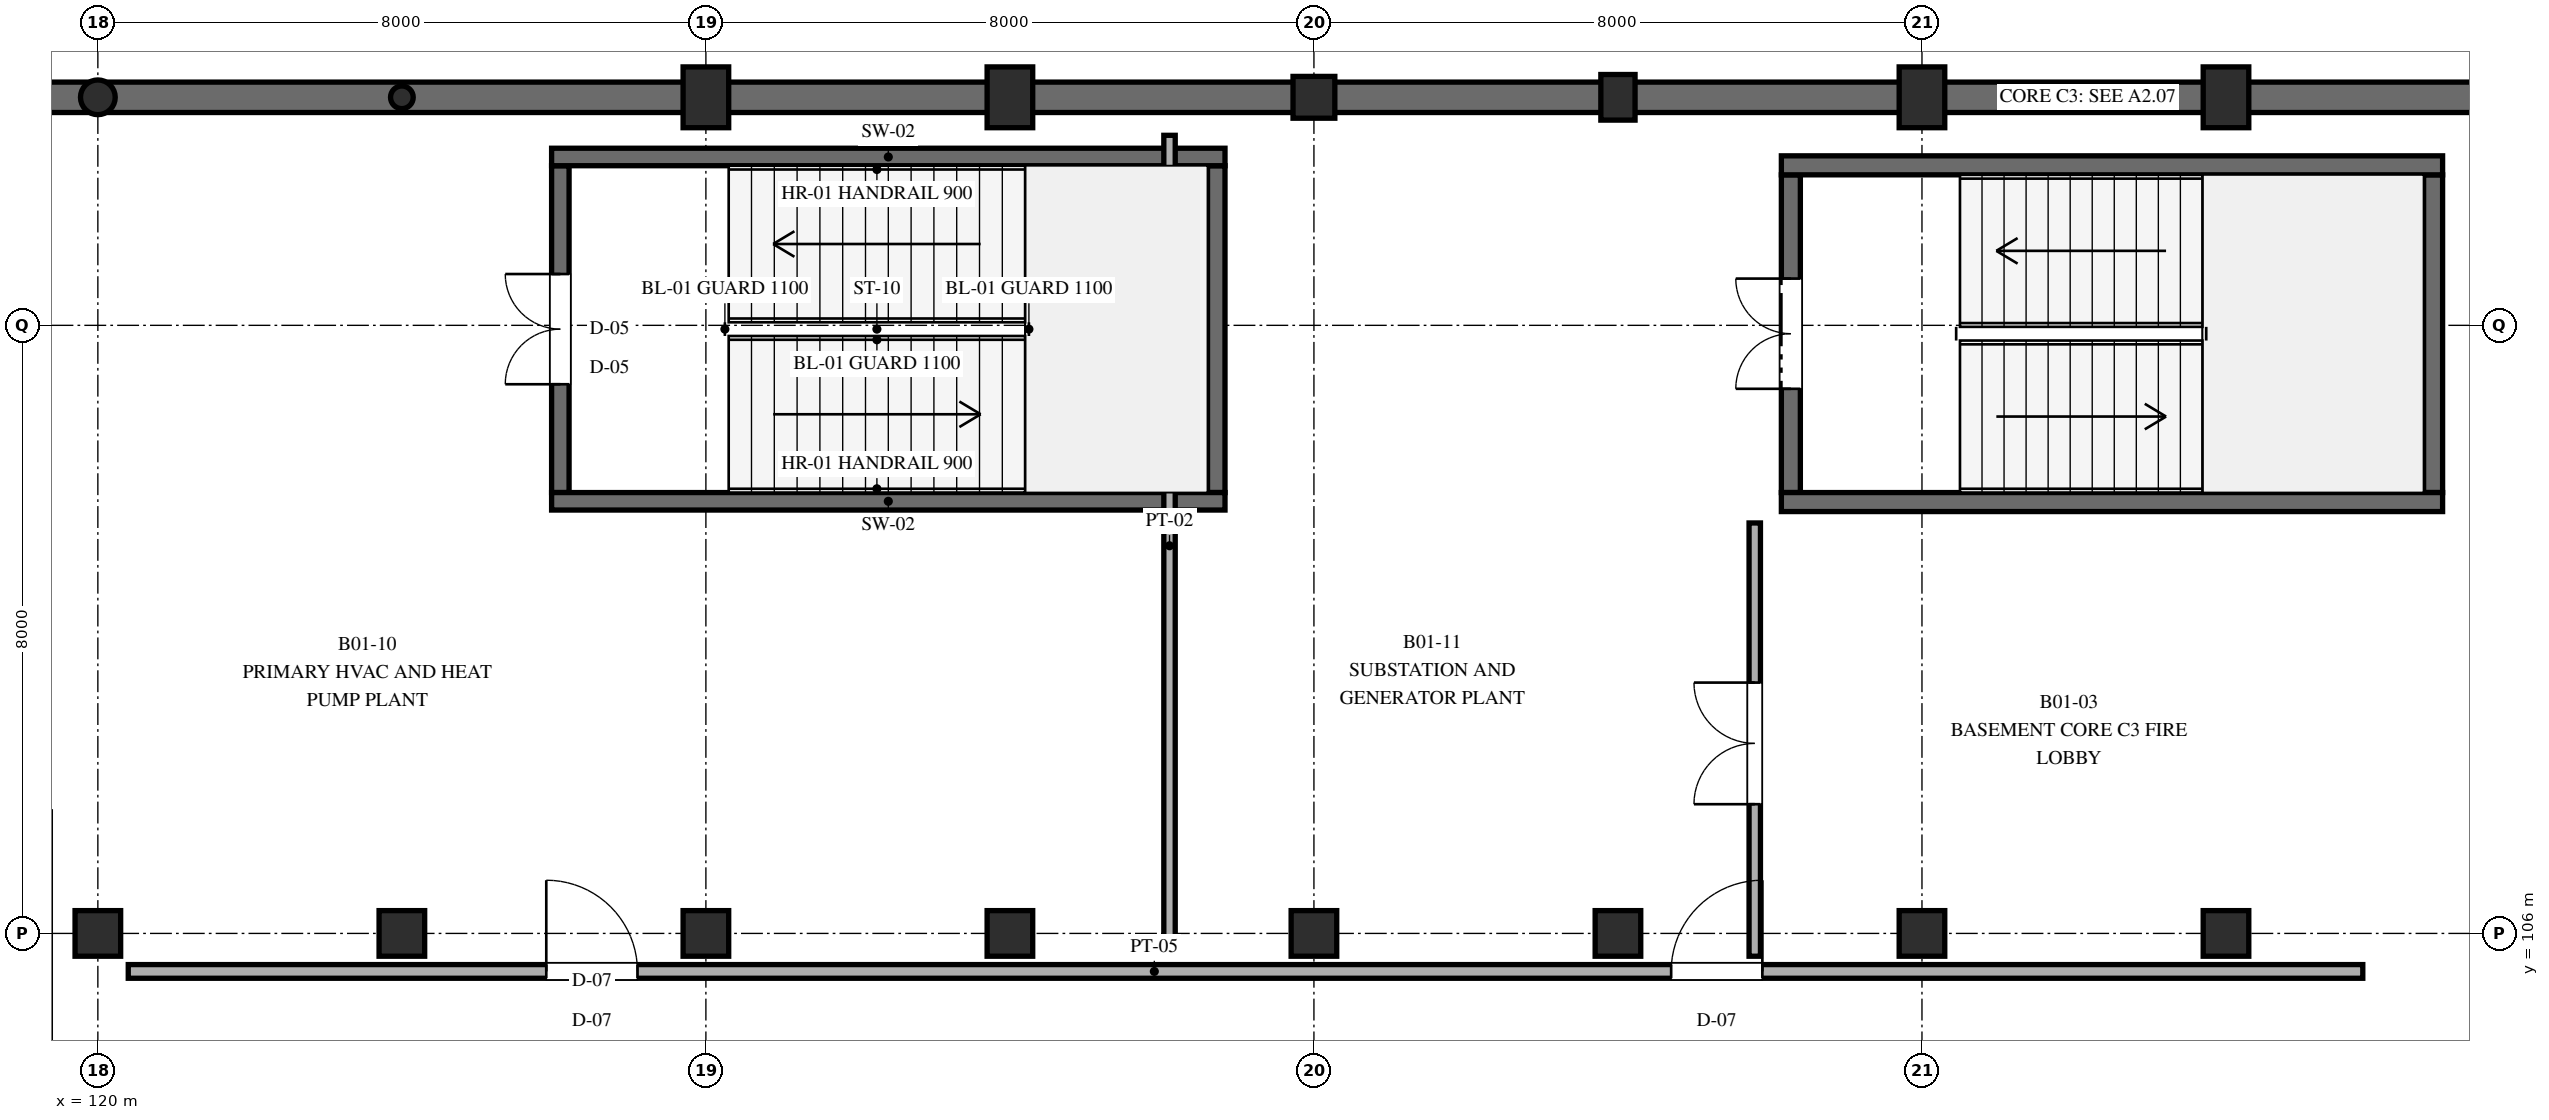
"""IFC4 building model, lengths in metres.
Left out: names, types, materials, properties, quantities, classifications, styles, units other than length and angle.
Written with IfcOpenShell. Run it as: python <this file> out.ifc"""

import sys

from ifc_helpers import new_model, si_unit, direction, frame, frame_2d, origin, origin_2d, place, context, subcontext, project, spatial, rectangle, hollow_circle, extrude, element, fill, save


model = new_model("IFC4")
c1 = context("Model", 3, precision=1e-05, world=origin(), true_north=direction((0.0, 1.0)))
c2 = subcontext(c1, "Body", "Model", "MODEL_VIEW")
j1 = project(units=[si_unit("LENGTHUNIT", "METRE"), si_unit("PLANEANGLEUNIT", "RADIAN")], contexts=[c1])
p1 = place(None, origin())
s1 = spatial("IfcSite", under=j1, at=p1, CompositionType="ELEMENT")
p2 = place(p1, origin())
s2 = spatial("IfcBuilding", under=s1, at=p2, CompositionType="ELEMENT")
p3 = place(p2, frame((0.0, 0.0, -4.2)))
s3 = spatial("IfcBuildingStorey", under=s2, at=p3, CompositionType="ELEMENT", Elevation=-4.2)
p4 = place(p3, frame((120.0, 106.0, 0.0), z_axis=(0.0, 0.0, 1.0), x_axis=(1.0, 0.0, 0.0)))
e1 = element("IfcColumn", 1, at=p4, inside=s3, PredefinedType="COLUMN", context=c2, shape_type="SweptSolid", body=[
    extrude(rectangle(XDim=0.6, YDim=0.6, at=origin_2d()), origin(), (0.0, 0.0, 1.0), 4.2),
])
p5 = place(p3, frame((120.0, 117.0, 0.0), z_axis=(0.0, 0.0, 1.0), x_axis=(1.0, 0.0, 0.0)))
e2 = element("IfcColumn", 2, at=p5, inside=s3, PredefinedType="COLUMN", context=c2, shape_type="SweptSolid", body=[
    extrude(hollow_circle(Radius=0.229, WallThickness=0.016, at=origin_2d()), origin(), (0.0, 0.0, 1.0), 4.2),
])
p6 = place(p3, frame((124.0, 106.0, 0.0), z_axis=(0.0, 0.0, 1.0), x_axis=(1.0, 0.0, 0.0)))
e3 = element("IfcColumn", 3, at=p6, inside=s3, PredefinedType="COLUMN", context=c2, shape_type="SweptSolid", body=[
    extrude(rectangle(XDim=0.6, YDim=0.6, at=origin_2d()), origin(), (0.0, 0.0, 1.0), 4.2),
])
p7 = place(p3, frame((124.0, 117.0, 0.0), z_axis=(0.0, 0.0, 1.0), x_axis=(1.0, 0.0, 0.0)))
e4 = element("IfcColumn", 4, at=p7, inside=s3, PredefinedType="COLUMN", context=c2, shape_type="SweptSolid", body=[
    extrude(hollow_circle(Radius=0.149, WallThickness=0.012, at=origin_2d()), origin(), (0.0, 0.0, 1.0), 4.2),
])
p8 = place(p3, frame((128.0, 106.0, 0.0), z_axis=(0.0, 0.0, 1.0), x_axis=(1.0, 0.0, 0.0)))
e5 = element("IfcColumn", 5, at=p8, inside=s3, PredefinedType="COLUMN", context=c2, shape_type="SweptSolid", body=[
    extrude(rectangle(XDim=0.6, YDim=0.6, at=origin_2d()), origin(), (0.0, 0.0, 1.0), 4.2),
])
p9 = place(p3, frame((128.0, 117.0, 0.0), z_axis=(0.0, 0.0, 1.0), x_axis=(1.0, 0.0, 0.0)))
e6 = element("IfcColumn", 6, at=p9, inside=s3, PredefinedType="COLUMN", context=c2, shape_type="SweptSolid", body=[
    extrude(rectangle(XDim=0.6, YDim=0.8, at=origin_2d()), origin(), (0.0, 0.0, 1.0), 4.2),
])
p10 = place(p3, frame((132.0, 106.0, 0.0), z_axis=(0.0, 0.0, 1.0), x_axis=(1.0, 0.0, 0.0)))
e7 = element("IfcColumn", 7, at=p10, inside=s3, PredefinedType="COLUMN", context=c2, shape_type="SweptSolid", body=[
    extrude(rectangle(XDim=0.6, YDim=0.6, at=origin_2d()), origin(), (0.0, 0.0, 1.0), 4.2),
])
p11 = place(p3, frame((132.0, 117.0, 0.0), z_axis=(0.0, 0.0, 1.0), x_axis=(1.0, 0.0, 0.0)))
e8 = element("IfcColumn", 8, at=p11, inside=s3, PredefinedType="COLUMN", context=c2, shape_type="SweptSolid", body=[
    extrude(rectangle(XDim=0.6, YDim=0.8, at=origin_2d()), origin(), (0.0, 0.0, 1.0), 4.2),
])
p12 = place(p3, frame((136.0, 106.0, 0.0), z_axis=(0.0, 0.0, 1.0), x_axis=(1.0, 0.0, 0.0)))
e9 = element("IfcColumn", 9, at=p12, inside=s3, PredefinedType="COLUMN", context=c2, shape_type="SweptSolid", body=[
    extrude(rectangle(XDim=0.6, YDim=0.6, at=origin_2d()), origin(), (0.0, 0.0, 1.0), 4.2),
])
p13 = place(p3, frame((136.0, 117.0, 0.0), z_axis=(0.0, 0.0, 1.0), x_axis=(1.0, 0.0, 0.0)))
e10 = element("IfcColumn", 10, at=p13, inside=s3, PredefinedType="COLUMN", context=c2, shape_type="SweptSolid", body=[
    extrude(rectangle(XDim=0.55, YDim=0.55, at=origin_2d()), origin(), (0.0, 0.0, 1.0), 4.2),
])
p14 = place(p3, frame((140.0, 106.0, 0.0), z_axis=(0.0, 0.0, 1.0), x_axis=(1.0, 0.0, 0.0)))
e11 = element("IfcColumn", 11, at=p14, inside=s3, PredefinedType="COLUMN", context=c2, shape_type="SweptSolid", body=[
    extrude(rectangle(XDim=0.6, YDim=0.6, at=origin_2d()), origin(), (0.0, 0.0, 1.0), 4.2),
])
p15 = place(p3, frame((140.0, 117.0, 0.0), z_axis=(0.0, 0.0, 1.0), x_axis=(1.0, 0.0, 0.0)))
e12 = element("IfcColumn", 12, at=p15, inside=s3, PredefinedType="COLUMN", context=c2, shape_type="SweptSolid", body=[
    extrude(rectangle(XDim=0.45, YDim=0.6, at=origin_2d()), origin(), (0.0, 0.0, 1.0), 4.2),
])
p16 = place(p3, frame((144.0, 106.0, 0.0), z_axis=(0.0, 0.0, 1.0), x_axis=(1.0, 0.0, 0.0)))
e13 = element("IfcColumn", 13, at=p16, inside=s3, PredefinedType="COLUMN", context=c2, shape_type="SweptSolid", body=[
    extrude(rectangle(XDim=0.6, YDim=0.6, at=origin_2d()), origin(), (0.0, 0.0, 1.0), 4.2),
])
p17 = place(p3, frame((144.0, 117.0, 0.0), z_axis=(0.0, 0.0, 1.0), x_axis=(1.0, 0.0, 0.0)))
e14 = element("IfcColumn", 14, at=p17, inside=s3, PredefinedType="COLUMN", context=c2, shape_type="SweptSolid", body=[
    extrude(rectangle(XDim=0.6, YDim=0.8, at=origin_2d()), origin(), (0.0, 0.0, 1.0), 4.2),
])
p18 = place(p3, frame((148.0, 106.0, 0.0), z_axis=(0.0, 0.0, 1.0), x_axis=(1.0, 0.0, 0.0)))
e15 = element("IfcColumn", 15, at=p18, inside=s3, PredefinedType="COLUMN", context=c2, shape_type="SweptSolid", body=[
    extrude(rectangle(XDim=0.6, YDim=0.6, at=origin_2d()), origin(), (0.0, 0.0, 1.0), 4.2),
])
p19 = place(p3, frame((148.0, 117.0, 0.0), z_axis=(0.0, 0.0, 1.0), x_axis=(1.0, 0.0, 0.0)))
e16 = element("IfcColumn", 16, at=p19, inside=s3, PredefinedType="COLUMN", context=c2, shape_type="SweptSolid", body=[
    extrude(rectangle(XDim=0.6, YDim=0.8, at=origin_2d()), origin(), (0.0, 0.0, 1.0), 4.2),
])
p20 = place(p3, frame((174.2, 117.0, 0.0), z_axis=(0.0, 0.0, 1.0), x_axis=(-1.0, 0.0, 0.0)))
e17 = element("IfcWall", 17, at=p20, inside=s3, PredefinedType="SOLIDWALL", context=c2, shape_type="SweptSolid", body=[
    extrude(rectangle(XDim=70.4, YDim=0.4, at=frame_2d((35.2, 0.0))), origin(), (0.0, 0.0, 1.0), 3.93),
])
p21 = place(p3, frame((142.275, 111.8, 0.0), z_axis=(0.0, 0.0, 1.0), x_axis=(0.0, 1.0, 0.0)))
e18 = element("IfcWall", 18, at=p21, inside=s3, PredefinedType="SHEAR", context=c2, shape_type="SweptSolid", body=[
    extrude(rectangle(XDim=4.18, YDim=0.25, at=frame_2d((2.09, 0.0))), origin(), (0.0, 0.0, 1.0), 4.2),
])
p22 = place(p21, frame((1.365, 0.0, 0.0)))
e19 = element("IfcOpeningElement", 19, at=p22, cuts=e18, PredefinedType="OPENING", context=c2, shape_type="SweptSolid", body=[
    extrude(rectangle(XDim=1.45, YDim=2.2, at=frame_2d((0.725, 1.1))), frame((0.0, 0.135, 0.0), z_axis=(0.0, -1.0, 0.0), x_axis=(1.0, 0.0, 0.0)), (0.0, 0.0, 1.0), 0.27),
])
p23 = place(p3, frame((150.725, 115.98, 0.0), z_axis=(0.0, 0.0, 1.0), x_axis=(0.0, -1.0, 0.0)))
e20 = element("IfcWall", 20, at=p23, inside=s3, PredefinedType="SHEAR", context=c2, shape_type="SweptSolid", body=[
    extrude(rectangle(XDim=4.18, YDim=0.25, at=frame_2d((2.09, 0.0))), origin(), (0.0, 0.0, 1.0), 4.2),
])
for number, where, z_axis, x_axis in (
    (21, (142.15, 111.675, 0.0), (0.0, 0.0, 1.0), (1.0, 0.0, 0.0)),
    (22, (150.85, 116.105, 0.0), (0.0, 0.0, 1.0), (-1.0, 0.0, 0.0)),
):
    element("IfcWall", number, at=place(p3, frame(where, z_axis=z_axis, x_axis=x_axis)), inside=s3, PredefinedType="SHEAR", context=c2, shape_type="SweptSolid", body=[
        extrude(rectangle(XDim=8.7, YDim=0.25, at=frame_2d((4.35, 0.0))), origin(), (0.0, 0.0, 1.0), 4.2),
    ])
p24 = place(p3, frame((126.085, 111.8, 0.0), z_axis=(0.0, 0.0, 1.0), x_axis=(0.0, 1.0, 0.0)))
e23 = element("IfcWall", 23, at=p24, inside=s3, PredefinedType="SHEAR", context=c2, shape_type="SweptSolid", body=[
    extrude(rectangle(XDim=4.3, YDim=0.23, at=frame_2d((2.15, 0.0))), origin(), (0.0, 0.0, 1.0), 4.2),
])
p25 = place(p24, frame((1.425, 0.0, 0.0)))
e24 = element("IfcOpeningElement", 24, at=p25, cuts=e23, PredefinedType="OPENING", context=c2, shape_type="SweptSolid", body=[
    extrude(rectangle(XDim=1.45, YDim=2.2, at=frame_2d((0.725, 1.1))), frame((0.0, 0.125, 0.0), z_axis=(0.0, -1.0, 0.0), x_axis=(1.0, 0.0, 0.0)), (0.0, 0.0, 1.0), 0.25),
])
p26 = place(p3, frame((134.715, 116.1, 0.0), z_axis=(0.0, 0.0, 1.0), x_axis=(0.0, -1.0, 0.0)))
e25 = element("IfcWall", 25, at=p26, inside=s3, PredefinedType="SHEAR", context=c2, shape_type="SweptSolid", body=[
    extrude(rectangle(XDim=4.3, YDim=0.23, at=frame_2d((2.15, 0.0))), origin(), (0.0, 0.0, 1.0), 4.2),
])
for number, where, z_axis, x_axis in (
    (26, (125.97, 111.685, 0.0), (0.0, 0.0, 1.0), (1.0, 0.0, 0.0)),
    (27, (134.83, 116.215, 0.0), (0.0, 0.0, 1.0), (-1.0, 0.0, 0.0)),
):
    element("IfcWall", number, at=place(p3, frame(where, z_axis=z_axis, x_axis=x_axis)), inside=s3, PredefinedType="SHEAR", context=c2, shape_type="SweptSolid", body=[
        extrude(rectangle(XDim=8.86, YDim=0.23, at=frame_2d((4.43, 0.0))), origin(), (0.0, 0.0, 1.0), 4.2),
    ])
p27 = place(p3, frame((120.4, 105.5, 0.0), z_axis=(0.0, 0.0, 1.0), x_axis=(1.0, 0.0, 0.0)))
e28 = element("IfcWall", 28, at=p27, inside=s3, PredefinedType="PARTITIONING", context=c2, shape_type="SweptSolid", body=[
    extrude(rectangle(XDim=29.4, YDim=0.18, at=frame_2d((14.7, 0.0))), origin(), (0.0, 0.0, 1.0), 3.25),
])
p28 = place(p27, frame((5.5, 0.0, 0.0)))
e29 = element("IfcOpeningElement", 29, at=p28, cuts=e28, PredefinedType="OPENING", context=c2, shape_type="SweptSolid", body=[
    extrude(rectangle(XDim=1.2, YDim=2.2, at=frame_2d((0.6, 1.1))), frame((0.0, 0.1, 0.0), z_axis=(0.0, -1.0, 0.0), x_axis=(1.0, 0.0, 0.0)), (0.0, 0.0, 1.0), 0.2),
])
p29 = place(p27, frame((20.3, 0.0, 0.0)))
e30 = element("IfcOpeningElement", 30, at=p29, cuts=e28, PredefinedType="OPENING", context=c2, shape_type="SweptSolid", body=[
    extrude(rectangle(XDim=1.2, YDim=2.2, at=frame_2d((0.6, 1.1))), frame((0.0, 0.1, 0.0), z_axis=(0.0, -1.0, 0.0), x_axis=(1.0, 0.0, 0.0)), (0.0, 0.0, 1.0), 0.2),
])
p30 = place(p3, frame((134.1, 105.7, 0.0), z_axis=(0.0, 0.0, 1.0), x_axis=(0.0, 1.0, 0.0)))
e31 = element("IfcWall", 31, at=p30, inside=s3, PredefinedType="PARTITIONING", context=c2, shape_type="SweptSolid", body=[
    extrude(rectangle(XDim=10.8, YDim=0.15, at=frame_2d((5.4, 0.0))), origin(), (0.0, 0.0, 1.0), 3.25),
])
p31 = place(p3, frame((141.8, 105.7, 0.0), z_axis=(0.0, 0.0, 1.0), x_axis=(0.0, 1.0, 0.0)))
e32 = element("IfcWall", 32, at=p31, inside=s3, PredefinedType="PARTITIONING", context=c2, shape_type="SweptSolid", body=[
    extrude(rectangle(XDim=5.7, YDim=0.15, at=frame_2d((2.85, 0.0))), origin(), (0.0, 0.0, 1.0), 3.25),
])
p32 = place(p31, frame((2.0, 0.0, 0.0)))
e33 = element("IfcOpeningElement", 33, at=p32, cuts=e32, PredefinedType="OPENING", context=c2, shape_type="SweptSolid", body=[
    extrude(rectangle(XDim=1.6, YDim=2.2, at=frame_2d((0.8, 1.1))), frame((0.0, 0.085, 0.0), z_axis=(0.0, -1.0, 0.0), x_axis=(1.0, 0.0, 0.0)), (0.0, 0.0, 1.0), 0.17),
])
p33 = place(p22, origin())
e34 = element("IfcDoor", 34, at=p33, inside=s3, OperationType="DOUBLE_DOOR_SINGLE_SWING", PredefinedType="DOOR", context=c2, shape_type="SweptSolid", body=[
    extrude(rectangle(XDim=1.45, YDim=2.2, at=frame_2d((0.725, 1.1))), frame((0.0, 0.025, 0.0), z_axis=(0.0, -1.0, 0.0), x_axis=(1.0, 0.0, 0.0)), (0.0, 0.0, 1.0), 0.05),
])
fill(e19, e34)
p34 = place(p25, origin())
e35 = element("IfcDoor", 35, at=p34, inside=s3, OperationType="DOUBLE_DOOR_SINGLE_SWING", PredefinedType="DOOR", context=c2, shape_type="SweptSolid", body=[
    extrude(rectangle(XDim=1.45, YDim=2.2, at=frame_2d((0.725, 1.1))), frame((0.0, 0.025, 0.0), z_axis=(0.0, -1.0, 0.0), x_axis=(1.0, 0.0, 0.0)), (0.0, 0.0, 1.0), 0.05),
])
fill(e24, e35)
p35 = place(p28, origin())
e36 = element("IfcDoor", 36, at=p35, inside=s3, OperationType="SINGLE_SWING_LEFT", PredefinedType="DOOR", context=c2, shape_type="SweptSolid", body=[
    extrude(rectangle(XDim=1.2, YDim=2.2, at=frame_2d((0.6, 1.1))), frame((0.0, 0.025, 0.0), z_axis=(0.0, -1.0, 0.0), x_axis=(1.0, 0.0, 0.0)), (0.0, 0.0, 1.0), 0.05),
])
fill(e29, e36)
p36 = place(p29, origin())
e37 = element("IfcDoor", 37, at=p36, inside=s3, OperationType="SINGLE_SWING_RIGHT", PredefinedType="DOOR", context=c2, shape_type="SweptSolid", body=[
    extrude(rectangle(XDim=1.2, YDim=2.2, at=frame_2d((0.6, 1.1))), frame((0.0, 0.025, 0.0), z_axis=(0.0, -1.0, 0.0), x_axis=(1.0, 0.0, 0.0)), (0.0, 0.0, 1.0), 0.05),
])
fill(e30, e37)
p37 = place(p32, origin())
e38 = element("IfcDoor", 38, at=p37, inside=s3, OperationType="DOUBLE_DOOR_SINGLE_SWING", PredefinedType="DOOR", context=c2, shape_type="SweptSolid", body=[
    extrude(rectangle(XDim=1.6, YDim=2.2, at=frame_2d((0.8, 1.1))), frame((0.0, 0.025, 0.0), z_axis=(0.0, -1.0, 0.0), x_axis=(1.0, 0.0, 0.0)), (0.0, 0.0, 1.0), 0.05),
])
fill(e33, e38)
save(model, sys.argv[1])
